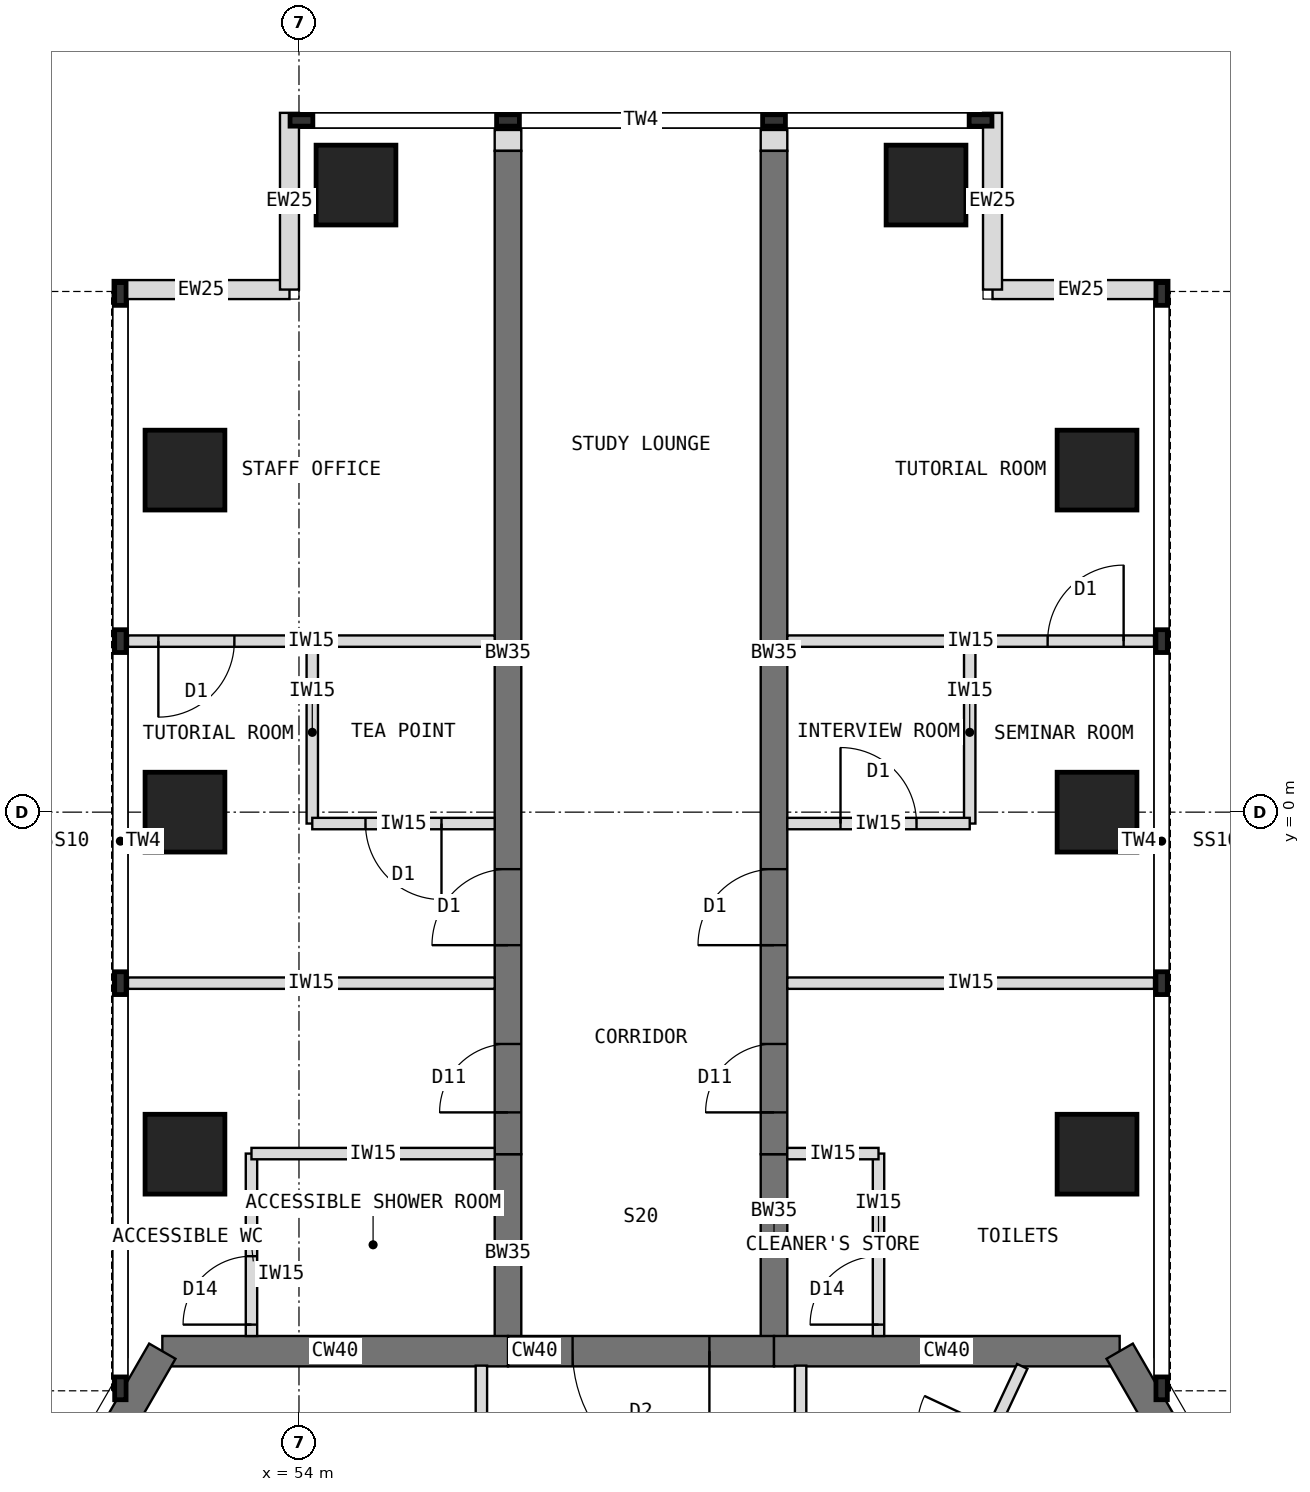
"""IFC4 building model, lengths in metres.
Left out: names, types, materials, properties, quantities, classifications, styles, units other than length and angle.
Written with IfcOpenShell. Run it as: python <this file> out.ifc"""

import sys

from ifc_helpers import new_model, si_unit, direction, frame, frame_2d, origin, origin_2d, place, context, subcontext, project, spatial, rectangle, extrude, element, fill, save


model = new_model("IFC4")
c1 = context("Model", 3, precision=1e-05, world=origin(), true_north=direction((0.0, 1.0)))
c2 = subcontext(c1, "Body", "Model", "MODEL_VIEW")
j1 = project(units=[si_unit("LENGTHUNIT", "METRE"), si_unit("PLANEANGLEUNIT", "RADIAN")], contexts=[c1])
p1 = place(None, origin())
s1 = spatial("IfcSite", under=j1, at=p1, CompositionType="ELEMENT")
p2 = place(p1, origin())
s2 = spatial("IfcBuilding", under=s1, at=p2, CompositionType="ELEMENT")
p3 = place(p2, frame((0.0, 0.0, 259.5)))
s3 = spatial("IfcBuildingStorey", under=s2, at=p3, CompositionType="ELEMENT", Elevation=259.5)
p4 = place(p3, frame((64.798, -7.092, 0.0), z_axis=(0.0, 0.0, 1.0), x_axis=(-1.0, 0.0, 0.0)))
e1 = element("IfcWall", 1, at=p4, inside=s3, PredefinedType="SHEAR", context=c2, shape_type="SweptSolid", body=[
    extrude(rectangle(XDim=4.548, YDim=0.4, at=frame_2d((2.274, 0.0))), origin(), (0.0, 0.0, 1.0), 4.0),
])
p5 = place(p3, frame((60.25, -7.092, 0.0), z_axis=(0.0, 0.0, 1.0), x_axis=(-1.0, 0.0, 0.0)))
e2 = element("IfcWall", 2, at=p5, inside=s3, PredefinedType="SHEAR", context=c2, shape_type="SweptSolid", body=[
    extrude(rectangle(XDim=3.5, YDim=0.4, at=frame_2d((1.75, 0.0))), origin(), (0.0, 0.0, 1.0), 4.0),
])
p6 = place(p5, frame((0.85, 0.0, 0.0)))
e3 = element("IfcOpeningElement", 3, at=p6, cuts=e2, PredefinedType="OPENING", context=c2, shape_type="SweptSolid", body=[
    extrude(rectangle(XDim=1.8, YDim=2.1, at=frame_2d((0.9, 1.05))), frame((0.0, 0.21, 0.0), z_axis=(0.0, -1.0, 0.0), x_axis=(1.0, 0.0, 0.0)), (0.0, 0.0, 1.0), 0.42),
])
p7 = place(p3, frame((56.75, -7.092, 0.0), z_axis=(0.0, 0.0, 1.0), x_axis=(-1.0, 0.0, 0.0)))
e4 = element("IfcWall", 4, at=p7, inside=s3, PredefinedType="SHEAR", context=c2, shape_type="SweptSolid", body=[
    extrude(rectangle(XDim=4.548, YDim=0.4, at=frame_2d((2.274, 0.0))), origin(), (0.0, 0.0, 1.0), 4.0),
])
for number, where, z_axis, x_axis in (
    (5, (52.202, -7.092, 0.0), (0.0, 0.0, 1.0), (-0.5, -0.866, 0.0)),
    (6, (71.096, -18.0, 0.0), (0.0, 0.0, 1.0), (-0.5, 0.866, 0.0)),
):
    element("IfcWall", number, at=place(p3, frame(where, z_axis=z_axis, x_axis=x_axis)), inside=s3, PredefinedType="SHEAR", context=c2, shape_type="SweptSolid", body=[
        extrude(rectangle(XDim=12.596, YDim=0.4, at=frame_2d((6.298, 0.0))), origin(), (0.0, 0.0, 1.0), 4.0),
    ])
p8 = place(p3, frame((56.75, -7.092, 0.0), z_axis=(0.0, 0.0, 1.0), x_axis=(0.0, 1.0, 0.0)))
e7 = element("IfcWall", 7, at=p8, inside=s3, PredefinedType="SHEAR", context=c2, shape_type="SweptSolid", body=[
    extrude(rectangle(XDim=2.592, YDim=0.35, at=frame_2d((1.296, 0.0))), origin(), (0.0, 0.0, 1.0), 4.0),
])
p9 = place(p3, frame((56.75, -4.5, 0.0), z_axis=(0.0, 0.0, 1.0), x_axis=(0.0, 1.0, 0.0)))
e8 = element("IfcWall", 8, at=p9, inside=s3, PredefinedType="SHEAR", context=c2, shape_type="SweptSolid", body=[
    extrude(rectangle(XDim=13.2, YDim=0.35, at=frame_2d((6.6, 0.0))), origin(), (0.0, 0.0, 1.0), 4.0),
])
p10 = place(p9, frame((0.55, 0.0, 0.0)))
e9 = element("IfcOpeningElement", 9, at=p10, cuts=e8, PredefinedType="OPENING", context=c2, shape_type="SweptSolid", body=[
    extrude(rectangle(XDim=0.9, YDim=2.1, at=frame_2d((0.45, 1.05))), frame((0.0, 0.185, 0.0), z_axis=(0.0, -1.0, 0.0), x_axis=(1.0, 0.0, 0.0)), (0.0, 0.0, 1.0), 0.37),
])
p11 = place(p9, frame((2.75, 0.0, 0.0)))
e10 = element("IfcOpeningElement", 10, at=p11, cuts=e8, PredefinedType="OPENING", context=c2, shape_type="SweptSolid", body=[
    extrude(rectangle(XDim=1.0, YDim=2.1, at=frame_2d((0.5, 1.05))), frame((0.0, 0.185, 0.0), z_axis=(0.0, -1.0, 0.0), x_axis=(1.0, 0.0, 0.0)), (0.0, 0.0, 1.0), 0.37),
])
p12 = place(p3, frame((60.25, -7.092, 0.0), z_axis=(0.0, 0.0, 1.0), x_axis=(0.0, 1.0, 0.0)))
e11 = element("IfcWall", 11, at=p12, inside=s3, PredefinedType="SHEAR", context=c2, shape_type="SweptSolid", body=[
    extrude(rectangle(XDim=2.592, YDim=0.35, at=frame_2d((1.296, 0.0))), origin(), (0.0, 0.0, 1.0), 4.0),
])
p13 = place(p3, frame((60.25, -4.5, 0.0), z_axis=(0.0, 0.0, 1.0), x_axis=(0.0, 1.0, 0.0)))
e12 = element("IfcWall", 12, at=p13, inside=s3, PredefinedType="SHEAR", context=c2, shape_type="SweptSolid", body=[
    extrude(rectangle(XDim=13.2, YDim=0.35, at=frame_2d((6.6, 0.0))), origin(), (0.0, 0.0, 1.0), 4.0),
])
p14 = place(p13, frame((0.55, 0.0, 0.0)))
e13 = element("IfcOpeningElement", 13, at=p14, cuts=e12, PredefinedType="OPENING", context=c2, shape_type="SweptSolid", body=[
    extrude(rectangle(XDim=0.9, YDim=2.1, at=frame_2d((0.45, 1.05))), frame((0.0, 0.185, 0.0), z_axis=(0.0, -1.0, 0.0), x_axis=(1.0, 0.0, 0.0)), (0.0, 0.0, 1.0), 0.37),
])
p15 = place(p13, frame((2.75, 0.0, 0.0)))
e14 = element("IfcOpeningElement", 14, at=p15, cuts=e12, PredefinedType="OPENING", context=c2, shape_type="SweptSolid", body=[
    extrude(rectangle(XDim=1.0, YDim=2.1, at=frame_2d((0.5, 1.05))), frame((0.0, 0.185, 0.0), z_axis=(0.0, -1.0, 0.0), x_axis=(1.0, 0.0, 0.0)), (0.0, 0.0, 1.0), 0.37),
])
for number, where, z_axis, x_axis in (
    (15, (52.5, -4.5, 0.0), (0.0, 0.0, 1.0), (1.0, 0.0, 0.0)),
    (16, (64.5, -4.5, 0.0), (0.0, 0.0, 1.0), (1.0, 0.0, 0.0)),
    (17, (52.5, 0.0, 0.0), (0.0, 0.0, 1.0), (1.0, 0.0, 0.0)),
    (18, (64.5, 0.0, 0.0), (0.0, 0.0, 1.0), (1.0, 0.0, 0.0)),
    (19, (52.5, 4.5, 0.0), (0.0, 0.0, 1.0), (1.0, 0.0, 0.0)),
    (20, (64.5, 4.5, 0.0), (0.0, 0.0, 1.0), (1.0, 0.0, 0.0)),
    (21, (54.75, 8.25, 0.0), (0.0, 0.0, 1.0), (1.0, 0.0, 0.0)),
    (22, (62.25, 8.25, 0.0), (0.0, 0.0, 1.0), (1.0, 0.0, 0.0)),
):
    element("IfcColumn", number, at=place(p3, frame(where, z_axis=z_axis, x_axis=x_axis)), inside=s3, PredefinedType="COLUMN", context=c2, shape_type="SweptSolid", body=[
        extrude(rectangle(XDim=1.05, YDim=1.05, at=origin_2d()), origin(), (0.0, 0.0, 1.0), 4.0),
    ])
for number, where, z_axis, x_axis in (
    (23, (51.55, 6.875, 0.0), (0.0, 0.0, 1.0), (1.0, 0.0, 0.0)),
    (24, (53.875, 6.875, 0.0), (0.0, 0.0, 1.0), (0.0, 1.0, 0.0)),
    (25, (65.45, 6.875, 0.0), (0.0, 0.0, 1.0), (-1.0, 0.0, 0.0)),
    (26, (63.125, 6.875, 0.0), (0.0, 0.0, 1.0), (0.0, 1.0, 0.0)),
):
    element("IfcWall", number, at=place(p3, frame(where, z_axis=z_axis, x_axis=x_axis)), inside=s3, PredefinedType="STANDARD", context=c2, shape_type="SweptSolid", body=[
        extrude(rectangle(XDim=2.325, YDim=0.25, at=frame_2d((1.163, 0.0))), origin(), (0.0, 0.0, 1.0), 3.8),
    ])
for number, where, z_axis, x_axis in (
    (27, (56.75, 8.7, 0.0), (0.0, 0.0, 1.0), (0.0, 1.0, 0.0)),
    (28, (60.25, 8.7, 0.0), (0.0, 0.0, 1.0), (0.0, 1.0, 0.0)),
):
    element("IfcWall", number, at=place(p3, frame(where, z_axis=z_axis, x_axis=x_axis)), inside=s3, PredefinedType="PARTITIONING", context=c2, shape_type="SweptSolid", body=[
        extrude(rectangle(XDim=0.275, YDim=0.35, at=frame_2d((0.138, 0.0))), origin(), (0.0, 0.0, 1.0), 3.8),
    ])
p16 = place(p3, frame((56.575, -2.25, 0.0), z_axis=(0.0, 0.0, 1.0), x_axis=(-1.0, 0.0, 0.0)))
e29 = element("IfcWall", 29, at=p16, inside=s3, PredefinedType="PARTITIONING", context=c2, shape_type="SweptSolid", body=[
    extrude(rectangle(XDim=4.825, YDim=0.15, at=frame_2d((2.413, 0.0))), origin(), (0.0, 0.0, 1.0), 3.8),
])
p17 = place(p3, frame((56.575, 2.25, 0.0), z_axis=(0.0, 0.0, 1.0), x_axis=(-1.0, 0.0, 0.0)))
e30 = element("IfcWall", 30, at=p17, inside=s3, PredefinedType="PARTITIONING", context=c2, shape_type="SweptSolid", body=[
    extrude(rectangle(XDim=4.825, YDim=0.15, at=frame_2d((2.413, 0.0))), origin(), (0.0, 0.0, 1.0), 3.8),
])
p18 = place(p17, frame((3.425, 0.0, 0.0)))
e31 = element("IfcOpeningElement", 31, at=p18, cuts=e30, PredefinedType="OPENING", context=c2, shape_type="SweptSolid", body=[
    extrude(rectangle(XDim=1.0, YDim=2.1, at=frame_2d((0.5, 1.05))), frame((0.0, 0.085, 0.0), z_axis=(0.0, -1.0, 0.0), x_axis=(1.0, 0.0, 0.0)), (0.0, 0.0, 1.0), 0.17),
])
p19 = place(p3, frame((54.175, -0.15, 0.0), z_axis=(0.0, 0.0, 1.0), x_axis=(0.0, 1.0, 0.0)))
e32 = element("IfcWall", 32, at=p19, inside=s3, PredefinedType="PARTITIONING", context=c2, shape_type="SweptSolid", body=[
    extrude(rectangle(XDim=2.4, YDim=0.15, at=frame_2d((1.2, 0.0))), origin(), (0.0, 0.0, 1.0), 3.8),
])
p20 = place(p3, frame((56.575, -0.15, 0.0), z_axis=(0.0, 0.0, 1.0), x_axis=(-1.0, 0.0, 0.0)))
e33 = element("IfcWall", 33, at=p20, inside=s3, PredefinedType="PARTITIONING", context=c2, shape_type="SweptSolid", body=[
    extrude(rectangle(XDim=2.4, YDim=0.15, at=frame_2d((1.2, 0.0))), origin(), (0.0, 0.0, 1.0), 3.8),
])
p21 = place(p20, frame((0.7, 0.0, 0.0)))
e34 = element("IfcOpeningElement", 34, at=p21, cuts=e33, PredefinedType="OPENING", context=c2, shape_type="SweptSolid", body=[
    extrude(rectangle(XDim=1.0, YDim=2.1, at=frame_2d((0.5, 1.05))), frame((0.0, 0.085, 0.0), z_axis=(0.0, -1.0, 0.0), x_axis=(1.0, 0.0, 0.0)), (0.0, 0.0, 1.0), 0.17),
])
p22 = place(p3, frame((53.375, -6.892, 0.0), z_axis=(0.0, 0.0, 1.0), x_axis=(0.0, 1.0, 0.0)))
e35 = element("IfcWall", 35, at=p22, inside=s3, PredefinedType="PARTITIONING", context=c2, shape_type="SweptSolid", body=[
    extrude(rectangle(XDim=2.4, YDim=0.15, at=frame_2d((1.2, 0.0))), origin(), (0.0, 0.0, 1.0), 3.8),
])
p23 = place(p22, frame((0.15, 0.0, 0.0)))
e36 = element("IfcOpeningElement", 36, at=p23, cuts=e35, PredefinedType="OPENING", context=c2, shape_type="SweptSolid", body=[
    extrude(rectangle(XDim=0.9, YDim=2.1, at=frame_2d((0.45, 1.05))), frame((0.0, 0.085, 0.0), z_axis=(0.0, -1.0, 0.0), x_axis=(1.0, 0.0, 0.0)), (0.0, 0.0, 1.0), 0.17),
])
p24 = place(p3, frame((56.575, -4.492, 0.0), z_axis=(0.0, 0.0, 1.0), x_axis=(-1.0, 0.0, 0.0)))
e37 = element("IfcWall", 37, at=p24, inside=s3, PredefinedType="PARTITIONING", context=c2, shape_type="SweptSolid", body=[
    extrude(rectangle(XDim=3.2, YDim=0.15, at=frame_2d((1.6, 0.0))), origin(), (0.0, 0.0, 1.0), 3.267),
])
p25 = place(p3, frame((60.425, -2.25, 0.0), z_axis=(0.0, 0.0, 1.0), x_axis=(1.0, 0.0, 0.0)))
e38 = element("IfcWall", 38, at=p25, inside=s3, PredefinedType="PARTITIONING", context=c2, shape_type="SweptSolid", body=[
    extrude(rectangle(XDim=4.825, YDim=0.15, at=frame_2d((2.413, 0.0))), origin(), (0.0, 0.0, 1.0), 3.8),
])
p26 = place(p3, frame((60.425, 2.25, 0.0), z_axis=(0.0, 0.0, 1.0), x_axis=(1.0, 0.0, 0.0)))
e39 = element("IfcWall", 39, at=p26, inside=s3, PredefinedType="PARTITIONING", context=c2, shape_type="SweptSolid", body=[
    extrude(rectangle(XDim=4.825, YDim=0.15, at=frame_2d((2.413, 0.0))), origin(), (0.0, 0.0, 1.0), 3.8),
])
p27 = place(p26, frame((3.425, 0.0, 0.0)))
e40 = element("IfcOpeningElement", 40, at=p27, cuts=e39, PredefinedType="OPENING", context=c2, shape_type="SweptSolid", body=[
    extrude(rectangle(XDim=1.0, YDim=2.1, at=frame_2d((0.5, 1.05))), frame((0.0, 0.085, 0.0), z_axis=(0.0, -1.0, 0.0), x_axis=(1.0, 0.0, 0.0)), (0.0, 0.0, 1.0), 0.17),
])
p28 = place(p3, frame((62.825, -0.15, 0.0), z_axis=(0.0, 0.0, 1.0), x_axis=(0.0, 1.0, 0.0)))
e41 = element("IfcWall", 41, at=p28, inside=s3, PredefinedType="PARTITIONING", context=c2, shape_type="SweptSolid", body=[
    extrude(rectangle(XDim=2.4, YDim=0.15, at=frame_2d((1.2, 0.0))), origin(), (0.0, 0.0, 1.0), 3.8),
])
p29 = place(p3, frame((60.425, -0.15, 0.0), z_axis=(0.0, 0.0, 1.0), x_axis=(1.0, 0.0, 0.0)))
e42 = element("IfcWall", 42, at=p29, inside=s3, PredefinedType="PARTITIONING", context=c2, shape_type="SweptSolid", body=[
    extrude(rectangle(XDim=2.4, YDim=0.15, at=frame_2d((1.2, 0.0))), origin(), (0.0, 0.0, 1.0), 3.8),
])
p30 = place(p29, frame((0.7, 0.0, 0.0)))
e43 = element("IfcOpeningElement", 43, at=p30, cuts=e42, PredefinedType="OPENING", context=c2, shape_type="SweptSolid", body=[
    extrude(rectangle(XDim=1.0, YDim=2.1, at=frame_2d((0.5, 1.05))), frame((0.0, 0.085, 0.0), z_axis=(0.0, -1.0, 0.0), x_axis=(1.0, 0.0, 0.0)), (0.0, 0.0, 1.0), 0.17),
])
p31 = place(p3, frame((61.625, -6.892, 0.0), z_axis=(0.0, 0.0, 1.0), x_axis=(0.0, 1.0, 0.0)))
e44 = element("IfcWall", 44, at=p31, inside=s3, PredefinedType="PARTITIONING", context=c2, shape_type="SweptSolid", body=[
    extrude(rectangle(XDim=2.4, YDim=0.15, at=frame_2d((1.2, 0.0))), origin(), (0.0, 0.0, 1.0), 3.8),
])
p32 = place(p31, frame((0.15, 0.0, 0.0)))
e45 = element("IfcOpeningElement", 45, at=p32, cuts=e44, PredefinedType="OPENING", context=c2, shape_type="SweptSolid", body=[
    extrude(rectangle(XDim=0.9, YDim=2.1, at=frame_2d((0.45, 1.05))), frame((0.0, 0.085, 0.0), z_axis=(0.0, -1.0, 0.0), x_axis=(1.0, 0.0, 0.0)), (0.0, 0.0, 1.0), 0.17),
])
p33 = place(p3, frame((60.425, -4.492, 0.0), z_axis=(0.0, 0.0, 1.0), x_axis=(1.0, 0.0, 0.0)))
e46 = element("IfcWall", 46, at=p33, inside=s3, PredefinedType="PARTITIONING", context=c2, shape_type="SweptSolid", body=[
    extrude(rectangle(XDim=1.2, YDim=0.15, at=frame_2d((0.6, 0.0))), origin(), (0.0, 0.0, 1.0), 3.267),
])
p34 = place(p3, frame((56.4, -11.857, 0.0), z_axis=(0.0, 0.0, 1.0), x_axis=(0.0, 1.0, 0.0)))
e47 = element("IfcWall", 47, at=p34, inside=s3, PredefinedType="PARTITIONING", context=c2, shape_type="SweptSolid", body=[
    extrude(rectangle(XDim=4.576, YDim=0.15, at=frame_2d((2.288, 0.0))), origin(), (0.0, 0.0, 1.0), 3.8),
])
p35 = place(p34, frame((0.873, 0.0, 0.0)))
e48 = element("IfcOpeningElement", 48, at=p35, cuts=e47, PredefinedType="OPENING", context=c2, shape_type="SweptSolid", body=[
    extrude(rectangle(XDim=1.0, YDim=2.1, at=frame_2d((0.5, 1.05))), frame((0.0, 0.085, 0.0), z_axis=(0.0, -1.0, 0.0), x_axis=(1.0, 0.0, 0.0)), (0.0, 0.0, 1.0), 0.17),
])
p36 = place(p3, frame((60.6, -7.282, 0.0), z_axis=(0.0, 0.0, 1.0), x_axis=(0.0, -1.0, 0.0)))
e49 = element("IfcWall", 49, at=p36, inside=s3, PredefinedType="PARTITIONING", context=c2, shape_type="SweptSolid", body=[
    extrude(rectangle(XDim=4.576, YDim=0.15, at=frame_2d((2.288, 0.0))), origin(), (0.0, 0.0, 1.0), 3.8),
])
p37 = place(p36, frame((0.873, 0.0, 0.0)))
e50 = element("IfcOpeningElement", 50, at=p37, cuts=e49, PredefinedType="OPENING", context=c2, shape_type="SweptSolid", body=[
    extrude(rectangle(XDim=1.0, YDim=2.1, at=frame_2d((0.5, 1.05))), frame((0.0, 0.085, 0.0), z_axis=(0.0, -1.0, 0.0), x_axis=(1.0, 0.0, 0.0)), (0.0, 0.0, 1.0), 0.17),
])
p38 = place(p3, frame((61.54, -11.511, 0.0), z_axis=(0.0, 0.0, 1.0), x_axis=(0.424198910408, 0.905569039007, 0.0)))
e51 = element("IfcWall", 51, at=p38, inside=s3, PredefinedType="PARTITIONING", context=c2, shape_type="SweptSolid", body=[
    extrude(rectangle(XDim=4.659, YDim=0.15, at=frame_2d((2.33, 0.0))), origin(), (0.0, 0.0, 1.0), 3.8),
])
p39 = place(p38, frame((2.761, 0.0, 0.0)))
e52 = element("IfcOpeningElement", 52, at=p39, cuts=e51, PredefinedType="OPENING", context=c2, shape_type="SweptSolid", body=[
    extrude(rectangle(XDim=1.0, YDim=2.1, at=frame_2d((0.5, 1.05))), frame((0.0, 0.085, 0.0), z_axis=(0.0, -1.0, 0.0), x_axis=(1.0, 0.0, 0.0)), (0.0, 0.0, 1.0), 0.17),
])
p40 = place(p6, origin())
e53 = element("IfcDoor", 53, at=p40, inside=s3, OperationType="DOUBLE_DOOR_DOUBLE_SWING", PredefinedType="DOOR", context=c2, shape_type="SweptSolid", body=[
    extrude(rectangle(XDim=1.8, YDim=2.1, at=frame_2d((0.9, 1.05))), frame((0.0, 0.025, 0.0), z_axis=(0.0, -1.0, 0.0), x_axis=(1.0, 0.0, 0.0)), (0.0, 0.0, 1.0), 0.05),
])
fill(e3, e53)
p41 = place(p18, origin())
e54 = element("IfcDoor", 54, at=p41, inside=s3, OperationType="SINGLE_SWING_RIGHT", PredefinedType="DOOR", context=c2, shape_type="SweptSolid", body=[
    extrude(rectangle(XDim=1.0, YDim=2.1, at=frame_2d((0.5, 1.05))), frame((0.0, 0.025, 0.0), z_axis=(0.0, -1.0, 0.0), x_axis=(1.0, 0.0, 0.0)), (0.0, 0.0, 1.0), 0.05),
])
fill(e31, e54)
p42 = place(p21, origin())
e55 = element("IfcDoor", 55, at=p42, inside=s3, OperationType="SINGLE_SWING_LEFT", PredefinedType="DOOR", context=c2, shape_type="SweptSolid", body=[
    extrude(rectangle(XDim=1.0, YDim=2.1, at=frame_2d((0.5, 1.05))), frame((0.0, 0.025, 0.0), z_axis=(0.0, -1.0, 0.0), x_axis=(1.0, 0.0, 0.0)), (0.0, 0.0, 1.0), 0.05),
])
fill(e34, e55)
p43 = place(p23, origin())
e56 = element("IfcDoor", 56, at=p43, inside=s3, OperationType="SINGLE_SWING_LEFT", PredefinedType="DOOR", context=c2, shape_type="SweptSolid", body=[
    extrude(rectangle(XDim=0.9, YDim=2.1, at=frame_2d((0.45, 1.05))), frame((0.0, 0.025, 0.0), z_axis=(0.0, -1.0, 0.0), x_axis=(1.0, 0.0, 0.0)), (0.0, 0.0, 1.0), 0.05),
])
fill(e36, e56)
p44 = place(p27, origin())
e57 = element("IfcDoor", 57, at=p44, inside=s3, OperationType="SINGLE_SWING_RIGHT", PredefinedType="DOOR", context=c2, shape_type="SweptSolid", body=[
    extrude(rectangle(XDim=1.0, YDim=2.1, at=frame_2d((0.5, 1.05))), frame((0.0, 0.025, 0.0), z_axis=(0.0, -1.0, 0.0), x_axis=(1.0, 0.0, 0.0)), (0.0, 0.0, 1.0), 0.05),
])
fill(e40, e57)
p45 = place(p30, origin())
e58 = element("IfcDoor", 58, at=p45, inside=s3, OperationType="SINGLE_SWING_LEFT", PredefinedType="DOOR", context=c2, shape_type="SweptSolid", body=[
    extrude(rectangle(XDim=1.0, YDim=2.1, at=frame_2d((0.5, 1.05))), frame((0.0, 0.025, 0.0), z_axis=(0.0, -1.0, 0.0), x_axis=(1.0, 0.0, 0.0)), (0.0, 0.0, 1.0), 0.05),
])
fill(e43, e58)
p46 = place(p32, origin())
e59 = element("IfcDoor", 59, at=p46, inside=s3, OperationType="SINGLE_SWING_LEFT", PredefinedType="DOOR", context=c2, shape_type="SweptSolid", body=[
    extrude(rectangle(XDim=0.9, YDim=2.1, at=frame_2d((0.45, 1.05))), frame((0.0, 0.025, 0.0), z_axis=(0.0, -1.0, 0.0), x_axis=(1.0, 0.0, 0.0)), (0.0, 0.0, 1.0), 0.05),
])
fill(e45, e59)
p47 = place(p10, origin())
e60 = element("IfcDoor", 60, at=p47, inside=s3, OperationType="SINGLE_SWING_LEFT", PredefinedType="DOOR", context=c2, shape_type="SweptSolid", body=[
    extrude(rectangle(XDim=0.9, YDim=2.1, at=frame_2d((0.45, 1.05))), frame((0.0, 0.025, 0.0), z_axis=(0.0, -1.0, 0.0), x_axis=(1.0, 0.0, 0.0)), (0.0, 0.0, 1.0), 0.05),
])
fill(e9, e60)
p48 = place(p11, origin())
e61 = element("IfcDoor", 61, at=p48, inside=s3, OperationType="SINGLE_SWING_LEFT", PredefinedType="DOOR", context=c2, shape_type="SweptSolid", body=[
    extrude(rectangle(XDim=1.0, YDim=2.1, at=frame_2d((0.5, 1.05))), frame((0.0, 0.025, 0.0), z_axis=(0.0, -1.0, 0.0), x_axis=(1.0, 0.0, 0.0)), (0.0, 0.0, 1.0), 0.05),
])
fill(e10, e61)
p49 = place(p14, origin())
e62 = element("IfcDoor", 62, at=p49, inside=s3, OperationType="SINGLE_SWING_LEFT", PredefinedType="DOOR", context=c2, shape_type="SweptSolid", body=[
    extrude(rectangle(XDim=0.9, YDim=2.1, at=frame_2d((0.45, 1.05))), frame((0.0, 0.025, 0.0), z_axis=(0.0, -1.0, 0.0), x_axis=(1.0, 0.0, 0.0)), (0.0, 0.0, 1.0), 0.05),
])
fill(e13, e62)
p50 = place(p15, origin())
e63 = element("IfcDoor", 63, at=p50, inside=s3, OperationType="SINGLE_SWING_LEFT", PredefinedType="DOOR", context=c2, shape_type="SweptSolid", body=[
    extrude(rectangle(XDim=1.0, YDim=2.1, at=frame_2d((0.5, 1.05))), frame((0.0, 0.025, 0.0), z_axis=(0.0, -1.0, 0.0), x_axis=(1.0, 0.0, 0.0)), (0.0, 0.0, 1.0), 0.05),
])
fill(e14, e63)
save(model, sys.argv[1])
